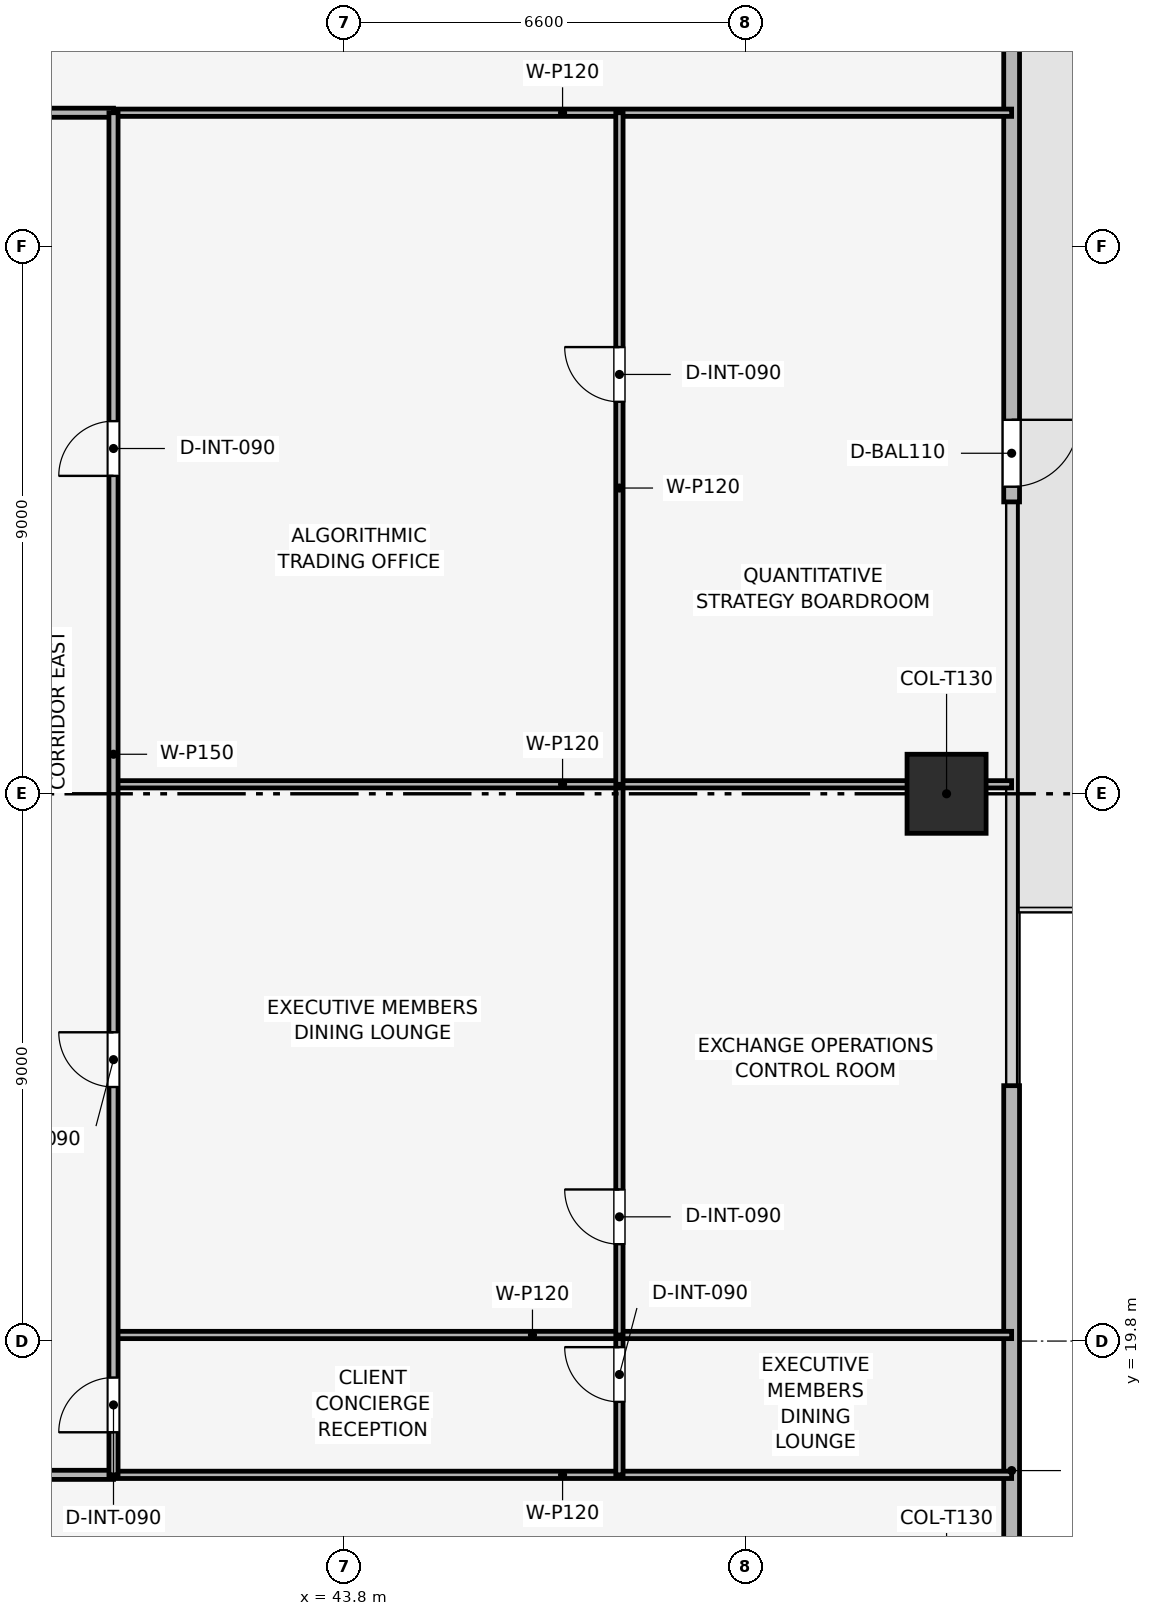
"""IFC4 building model, lengths in metres.
Left out: names, types, materials, properties, quantities, classifications, styles, units other than length and angle.
Written with IfcOpenShell. Run it as: python <this file> out.ifc"""

import sys

from ifc_helpers import new_model, si_unit, direction, frame, frame_2d, origin, origin_2d, place, context, subcontext, project, spatial, rectangle, extrude, element, fill, save


model = new_model("IFC4")
c1 = context("Model", 3, precision=1e-05, world=origin(), true_north=direction((0.0, 1.0)))
c2 = subcontext(c1, "Body", "Model", "MODEL_VIEW")
j1 = project(units=[si_unit("LENGTHUNIT", "METRE"), si_unit("PLANEANGLEUNIT", "RADIAN")], contexts=[c1])
p1 = place(None, origin())
s1 = spatial("IfcSite", under=j1, at=p1, CompositionType="ELEMENT")
p2 = place(p1, origin())
s2 = spatial("IfcBuilding", under=s1, at=p2, CompositionType="ELEMENT")
p3 = place(p2, frame((0.0, 0.0, 121.2)))
s3 = spatial("IfcBuildingStorey", under=s2, at=p3, CompositionType="ELEMENT", Elevation=121.2)
p4 = place(p3, frame((53.7, 28.8, 0.003), z_axis=(0.0, 0.0, 1.0), x_axis=(1.0, 0.0, 0.0)))
e1 = element("IfcColumn", 1, at=p4, inside=s3, PredefinedType="COLUMN", context=c2, shape_type="SweptSolid", body=[
    extrude(rectangle(XDim=1.3, YDim=1.3, at=origin_2d()), origin(), (0.0, 0.0, 1.0), 3.644),
])
p5 = place(p3, frame((54.77, 47.7, 0.0), z_axis=(0.0, 0.0, 1.0), x_axis=(0.0, -1.0, 0.0)))
e2 = element("IfcWall", 2, at=p5, inside=s3, PredefinedType="SOLIDWALL", context=c2, shape_type="SweptSolid", body=[
    extrude(rectangle(XDim=14.1, YDim=0.26, at=frame_2d((7.05, 0.0))), origin(), (0.0, 0.0, 1.0), 3.65),
])
p6 = place(p5, frame((12.75, 0.0, 0.0)))
e3 = element("IfcOpeningElement", 3, at=p6, cuts=e2, PredefinedType="OPENING", context=c2, shape_type="SweptSolid", body=[
    extrude(rectangle(XDim=1.1, YDim=2.2, at=frame_2d((0.55, 1.1))), frame((0.0, 0.14, 0.0), z_axis=(0.0, -1.0, 0.0), x_axis=(1.0, 0.0, 0.0)), (0.0, 0.0, 1.0), 0.28),
])
p7 = place(p3, frame((54.77, 24.0, 0.0), z_axis=(0.0, 0.0, 1.0), x_axis=(0.0, -1.0, 0.0)))
e4 = element("IfcWall", 4, at=p7, inside=s3, PredefinedType="SOLIDWALL", context=c2, shape_type="SweptSolid", body=[
    extrude(rectangle(XDim=14.1, YDim=0.26, at=frame_2d((7.05, 0.0))), origin(), (0.0, 0.0, 1.0), 3.65),
])
p8 = place(p7, frame((12.65, 0.0, 0.9)))
e5 = element("IfcOpeningElement", 5, at=p8, cuts=e4, PredefinedType="OPENING", context=c2, shape_type="SweptSolid", body=[
    extrude(rectangle(XDim=1.2, YDim=2.1, at=frame_2d((0.6, 1.05))), frame((0.0, 0.14, 0.0), z_axis=(0.0, -1.0, 0.0), x_axis=(1.0, 0.0, 0.0)), (0.0, 0.0, 1.0), 0.28),
])
for number, where, z_axis, x_axis in (
    (6, (40.0, 17.6, 0.0), (0.0, 0.0, 1.0), (1.0, 0.0, 0.0)),
    (7, (40.0, 40.0, 0.0), (0.0, 0.0, 1.0), (1.0, 0.0, 0.0)),
):
    element("IfcWall", number, at=place(p3, frame(where, z_axis=z_axis, x_axis=x_axis)), inside=s3, PredefinedType="PARTITIONING", context=c2, shape_type="SweptSolid", body=[
        extrude(rectangle(XDim=14.77, YDim=0.12, at=frame_2d((7.385, 0.0))), origin(), (0.0, 0.0, 1.0), 3.035),
    ])
p9 = place(p3, frame((48.32, 17.6, 0.0), z_axis=(0.0, 0.0, 1.0), x_axis=(0.0, 1.0, 0.0)))
e8 = element("IfcWall", 8, at=p9, inside=s3, PredefinedType="PARTITIONING", context=c2, shape_type="SweptSolid", body=[
    extrude(rectangle(XDim=2.3, YDim=0.12, at=frame_2d((1.15, 0.0))), origin(), (0.0, 0.0, 1.0), 3.65),
])
p10 = place(p9, frame((1.2, 0.0, 0.0)))
e9 = element("IfcOpeningElement", 9, at=p10, cuts=e8, PredefinedType="OPENING", context=c2, shape_type="SweptSolid", body=[
    extrude(rectangle(XDim=0.9, YDim=2.1, at=frame_2d((0.45, 1.05))), frame((0.0, 0.07, 0.0), z_axis=(0.0, -1.0, 0.0), x_axis=(1.0, 0.0, 0.0)), (0.0, 0.0, 1.0), 0.14),
])
p11 = place(p3, frame((40.0, 19.9, 0.0), z_axis=(0.0, 0.0, 1.0), x_axis=(1.0, 0.0, 0.0)))
e10 = element("IfcWall", 10, at=p11, inside=s3, PredefinedType="PARTITIONING", context=c2, shape_type="SweptSolid", body=[
    extrude(rectangle(XDim=14.77, YDim=0.12, at=frame_2d((7.385, 0.0))), origin(), (0.0, 0.0, 1.0), 3.035),
])
p12 = place(p3, frame((48.32, 19.9, 0.0), z_axis=(0.0, 0.0, 1.0), x_axis=(0.0, 1.0, 0.0)))
e11 = element("IfcWall", 11, at=p12, inside=s3, PredefinedType="PARTITIONING", context=c2, shape_type="SweptSolid", body=[
    extrude(rectangle(XDim=9.056, YDim=0.12, at=frame_2d((4.528, 0.0))), origin(), (0.0, 0.0, 1.0), 3.185),
])
p13 = place(p12, frame((1.493, 0.0, 0.0)))
e12 = element("IfcOpeningElement", 12, at=p13, cuts=e11, PredefinedType="OPENING", context=c2, shape_type="SweptSolid", body=[
    extrude(rectangle(XDim=0.9, YDim=2.1, at=frame_2d((0.45, 1.05))), frame((0.0, 0.07, 0.0), z_axis=(0.0, -1.0, 0.0), x_axis=(1.0, 0.0, 0.0)), (0.0, 0.0, 1.0), 0.14),
])
p14 = place(p3, frame((40.0, 28.956, 0.0), z_axis=(0.0, 0.0, 1.0), x_axis=(1.0, 0.0, 0.0)))
e13 = element("IfcWall", 13, at=p14, inside=s3, PredefinedType="PARTITIONING", context=c2, shape_type="SweptSolid", body=[
    extrude(rectangle(XDim=14.77, YDim=0.12, at=frame_2d((7.385, 0.0))), origin(), (0.0, 0.0, 1.0), 3.035),
])
p15 = place(p3, frame((48.32, 28.956, 0.0), z_axis=(0.0, 0.0, 1.0), x_axis=(0.0, 1.0, 0.0)))
e14 = element("IfcWall", 14, at=p15, inside=s3, PredefinedType="PARTITIONING", context=c2, shape_type="SweptSolid", body=[
    extrude(rectangle(XDim=11.044, YDim=0.12, at=frame_2d((5.522, 0.0))), origin(), (0.0, 0.0, 1.0), 3.185),
])
p16 = place(p15, frame((6.29, 0.0, 0.0)))
e15 = element("IfcOpeningElement", 15, at=p16, cuts=e14, PredefinedType="OPENING", context=c2, shape_type="SweptSolid", body=[
    extrude(rectangle(XDim=0.9, YDim=2.1, at=frame_2d((0.45, 1.05))), frame((0.0, 0.07, 0.0), z_axis=(0.0, -1.0, 0.0), x_axis=(1.0, 0.0, 0.0)), (0.0, 0.0, 1.0), 0.14),
])
p17 = place(p3, frame((17.6, 17.6, 0.0), z_axis=(0.0, 0.0, 1.0), x_axis=(1.0, 0.0, 0.0)))
e16 = element("IfcWall", 16, at=p17, inside=s3, PredefinedType="PARTITIONING", context=c2, shape_type="SweptSolid", body=[
    extrude(rectangle(XDim=22.4, YDim=0.15, at=frame_2d((11.2, 0.0))), origin(), (0.0, 0.0, 1.0), 3.185),
])
p18 = place(p17, frame((0.804, 0.0, 0.0)))
e17 = element("IfcOpeningElement", 17, at=p18, cuts=e16, PredefinedType="OPENING", context=c2, shape_type="SweptSolid", body=[
    extrude(rectangle(XDim=0.9, YDim=2.1, at=frame_2d((0.45, 1.05))), frame((0.0, 0.085, 0.0), z_axis=(0.0, -1.0, 0.0), x_axis=(1.0, 0.0, 0.0)), (0.0, 0.0, 1.0), 0.17),
])
p19 = place(p17, frame((6.424, 0.0, 0.0)))
e18 = element("IfcOpeningElement", 18, at=p19, cuts=e16, PredefinedType="OPENING", context=c2, shape_type="SweptSolid", body=[
    extrude(rectangle(XDim=0.9, YDim=2.1, at=frame_2d((0.45, 1.05))), frame((0.0, 0.085, 0.0), z_axis=(0.0, -1.0, 0.0), x_axis=(1.0, 0.0, 0.0)), (0.0, 0.0, 1.0), 0.17),
])
p20 = place(p17, frame((16.369, 0.0, 0.0)))
e19 = element("IfcOpeningElement", 19, at=p20, cuts=e16, PredefinedType="OPENING", context=c2, shape_type="SweptSolid", body=[
    extrude(rectangle(XDim=0.9, YDim=2.1, at=frame_2d((0.45, 1.05))), frame((0.0, 0.085, 0.0), z_axis=(0.0, -1.0, 0.0), x_axis=(1.0, 0.0, 0.0)), (0.0, 0.0, 1.0), 0.17),
])
p21 = place(p3, frame((17.6, 40.0, 0.0), z_axis=(0.0, 0.0, 1.0), x_axis=(1.0, 0.0, 0.0)))
e20 = element("IfcWall", 20, at=p21, inside=s3, PredefinedType="PARTITIONING", context=c2, shape_type="SweptSolid", body=[
    extrude(rectangle(XDim=22.4, YDim=0.15, at=frame_2d((11.2, 0.0))), origin(), (0.0, 0.0, 1.0), 3.185),
])
p22 = place(p21, frame((10.75, 0.0, 0.0)))
e21 = element("IfcOpeningElement", 21, at=p22, cuts=e20, PredefinedType="OPENING", context=c2, shape_type="SweptSolid", body=[
    extrude(rectangle(XDim=0.9, YDim=2.1, at=frame_2d((0.45, 1.05))), frame((0.0, 0.085, 0.0), z_axis=(0.0, -1.0, 0.0), x_axis=(1.0, 0.0, 0.0)), (0.0, 0.0, 1.0), 0.17),
])
p23 = place(p3, frame((40.0, 17.6, 0.0), z_axis=(0.0, 0.0, 1.0), x_axis=(0.0, 1.0, 0.0)))
e22 = element("IfcWall", 22, at=p23, inside=s3, PredefinedType="PARTITIONING", context=c2, shape_type="SweptSolid", body=[
    extrude(rectangle(XDim=22.4, YDim=0.15, at=frame_2d((11.2, 0.0))), origin(), (0.0, 0.0, 1.0), 3.185),
])
p24 = place(p23, frame((0.7, 0.0, 0.0)))
e23 = element("IfcOpeningElement", 23, at=p24, cuts=e22, PredefinedType="OPENING", context=c2, shape_type="SweptSolid", body=[
    extrude(rectangle(XDim=0.9, YDim=2.1, at=frame_2d((0.45, 1.05))), frame((0.0, 0.085, 0.0), z_axis=(0.0, -1.0, 0.0), x_axis=(1.0, 0.0, 0.0)), (0.0, 0.0, 1.0), 0.17),
])
p25 = place(p23, frame((6.378, 0.0, 0.0)))
e24 = element("IfcOpeningElement", 24, at=p25, cuts=e22, PredefinedType="OPENING", context=c2, shape_type="SweptSolid", body=[
    extrude(rectangle(XDim=0.9, YDim=2.1, at=frame_2d((0.45, 1.05))), frame((0.0, 0.085, 0.0), z_axis=(0.0, -1.0, 0.0), x_axis=(1.0, 0.0, 0.0)), (0.0, 0.0, 1.0), 0.17),
])
p26 = place(p23, frame((16.428, 0.0, 0.0)))
e25 = element("IfcOpeningElement", 25, at=p26, cuts=e22, PredefinedType="OPENING", context=c2, shape_type="SweptSolid", body=[
    extrude(rectangle(XDim=0.9, YDim=2.1, at=frame_2d((0.45, 1.05))), frame((0.0, 0.085, 0.0), z_axis=(0.0, -1.0, 0.0), x_axis=(1.0, 0.0, 0.0)), (0.0, 0.0, 1.0), 0.17),
])
p27 = place(p6, origin())
e26 = element("IfcDoor", 26, at=p27, inside=s3, OperationType="SINGLE_SWING_LEFT", PredefinedType="DOOR", context=c2, shape_type="SweptSolid", body=[
    extrude(rectangle(XDim=1.1, YDim=2.2, at=frame_2d((0.55, 1.1))), frame((0.0, 0.025, 0.0), z_axis=(0.0, -1.0, 0.0), x_axis=(1.0, 0.0, 0.0)), (0.0, 0.0, 1.0), 0.05),
])
fill(e3, e26)
p28 = place(p10, origin())
e27 = element("IfcDoor", 27, at=p28, inside=s3, OperationType="SINGLE_SWING_RIGHT", PredefinedType="DOOR", context=c2, shape_type="SweptSolid", body=[
    extrude(rectangle(XDim=0.9, YDim=2.1, at=frame_2d((0.45, 1.05))), frame((0.0, 0.025, 0.0), z_axis=(0.0, -1.0, 0.0), x_axis=(1.0, 0.0, 0.0)), (0.0, 0.0, 1.0), 0.05),
])
fill(e9, e27)
p29 = place(p13, origin())
e28 = element("IfcDoor", 28, at=p29, inside=s3, OperationType="SINGLE_SWING_RIGHT", PredefinedType="DOOR", context=c2, shape_type="SweptSolid", body=[
    extrude(rectangle(XDim=0.9, YDim=2.1, at=frame_2d((0.45, 1.05))), frame((0.0, 0.025, 0.0), z_axis=(0.0, -1.0, 0.0), x_axis=(1.0, 0.0, 0.0)), (0.0, 0.0, 1.0), 0.05),
])
fill(e12, e28)
p30 = place(p16, origin())
e29 = element("IfcDoor", 29, at=p30, inside=s3, OperationType="SINGLE_SWING_RIGHT", PredefinedType="DOOR", context=c2, shape_type="SweptSolid", body=[
    extrude(rectangle(XDim=0.9, YDim=2.1, at=frame_2d((0.45, 1.05))), frame((0.0, 0.025, 0.0), z_axis=(0.0, -1.0, 0.0), x_axis=(1.0, 0.0, 0.0)), (0.0, 0.0, 1.0), 0.05),
])
fill(e15, e29)
p31 = place(p24, origin())
e30 = element("IfcDoor", 30, at=p31, inside=s3, OperationType="SINGLE_SWING_LEFT", PredefinedType="DOOR", context=c2, shape_type="SweptSolid", body=[
    extrude(rectangle(XDim=0.9, YDim=2.1, at=frame_2d((0.45, 1.05))), frame((0.0, 0.025, 0.0), z_axis=(0.0, -1.0, 0.0), x_axis=(1.0, 0.0, 0.0)), (0.0, 0.0, 1.0), 0.05),
])
fill(e23, e30)
p32 = place(p25, origin())
e31 = element("IfcDoor", 31, at=p32, inside=s3, OperationType="SINGLE_SWING_RIGHT", PredefinedType="DOOR", context=c2, shape_type="SweptSolid", body=[
    extrude(rectangle(XDim=0.9, YDim=2.1, at=frame_2d((0.45, 1.05))), frame((0.0, 0.025, 0.0), z_axis=(0.0, -1.0, 0.0), x_axis=(1.0, 0.0, 0.0)), (0.0, 0.0, 1.0), 0.05),
])
fill(e24, e31)
p33 = place(p26, origin())
e32 = element("IfcDoor", 32, at=p33, inside=s3, OperationType="SINGLE_SWING_LEFT", PredefinedType="DOOR", context=c2, shape_type="SweptSolid", body=[
    extrude(rectangle(XDim=0.9, YDim=2.1, at=frame_2d((0.45, 1.05))), frame((0.0, 0.025, 0.0), z_axis=(0.0, -1.0, 0.0), x_axis=(1.0, 0.0, 0.0)), (0.0, 0.0, 1.0), 0.05),
])
fill(e25, e32)
save(model, sys.argv[1])
